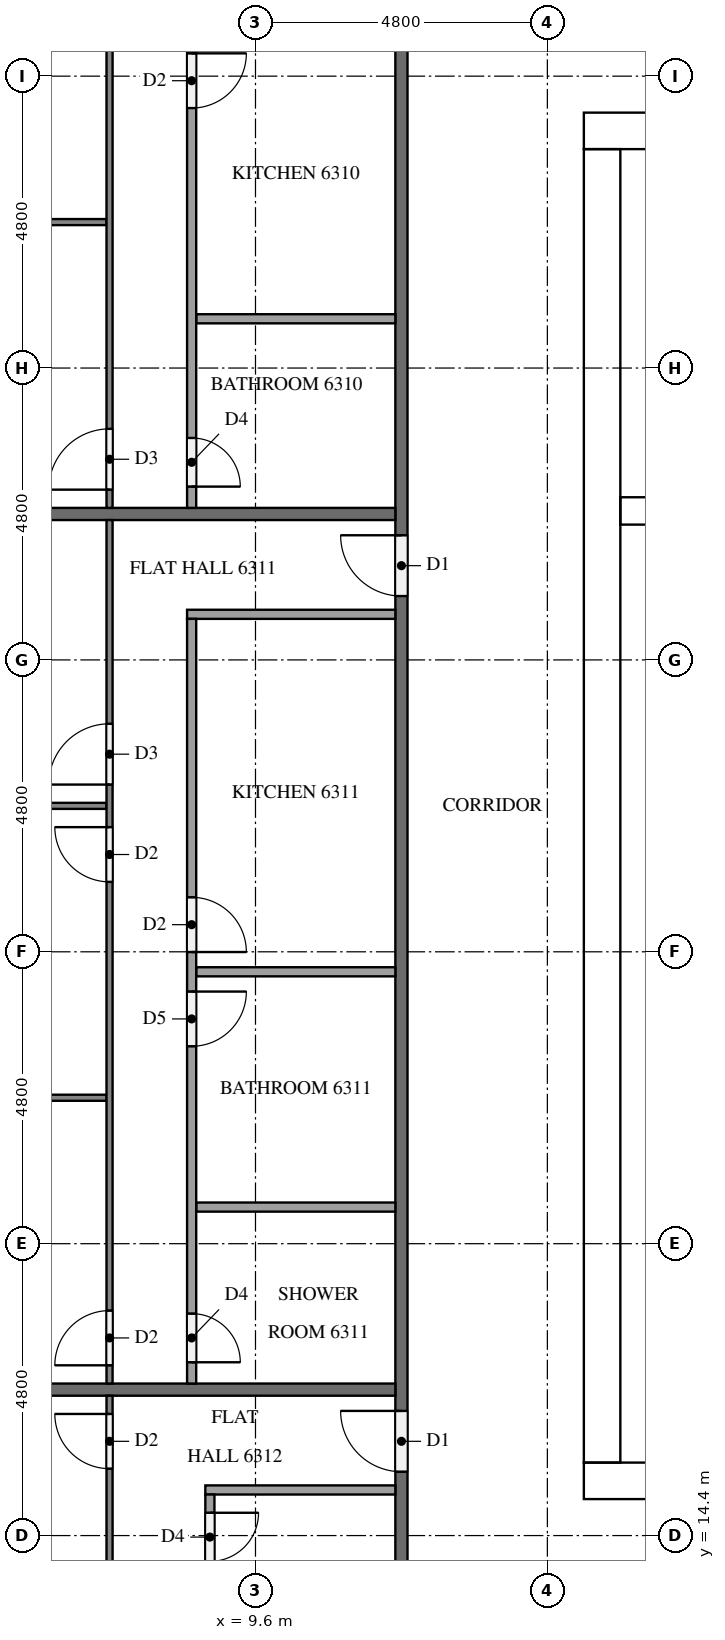
"""IFC4 building model, lengths in metres.
Left out: names, types, materials, properties, quantities, classifications, styles, units other than length and angle.
Written with IfcOpenShell. Run it as: python <this file> out.ifc"""

import sys

from ifc_helpers import new_model, si_unit, direction, frame, frame_2d, origin, place, context, subcontext, project, spatial, rectangle, extrude, element, fill, save


model = new_model("IFC4")
c1 = context("Model", 3, precision=1e-05, world=origin(), true_north=direction((0.0, 1.0)))
c2 = subcontext(c1, "Body", "Model", "MODEL_VIEW")
j1 = project(units=[si_unit("LENGTHUNIT", "METRE"), si_unit("PLANEANGLEUNIT", "RADIAN")], contexts=[c1])
p1 = place(None, origin())
s1 = spatial("IfcSite", under=j1, at=p1, CompositionType="ELEMENT")
p2 = place(p1, origin())
s2 = spatial("IfcBuilding", under=s1, at=p2, CompositionType="ELEMENT")
p3 = place(p2, frame((0.0, 0.0, 242.2)))
s3 = spatial("IfcBuildingStorey", under=s2, at=p3, CompositionType="ELEMENT", Elevation=242.2)
p4 = place(p3, frame((15.0, 15.3, 0.0), z_axis=(0.0, 0.0, 1.0), x_axis=(1.0, 0.0, 0.0)))
e1 = element("IfcWall", 1, at=p4, inside=s3, PredefinedType="SHEAR", context=c2, shape_type="SweptSolid", body=[
    extrude(rectangle(XDim=32.4, YDim=0.6, at=frame_2d((16.2, 0.0))), origin(), (0.0, 0.0, 1.0), 3.2),
])
p5 = place(p4, frame((15.3, 0.0, 0.0)))
e2 = element("IfcOpeningElement", 2, at=p5, cuts=e1, PredefinedType="OPENING", context=c2, shape_type="SweptSolid", body=[
    extrude(rectangle(XDim=1.8, YDim=2.1, at=frame_2d((0.9, 1.05))), frame((0.0, 0.31, 0.0), z_axis=(0.0, -1.0, 0.0), x_axis=(1.0, 0.0, 0.0)), (0.0, 0.0, 1.0), 0.62),
])
p6 = place(p3, frame((15.0, 37.5, 0.0), z_axis=(0.0, 0.0, 1.0), x_axis=(1.0, 0.0, 0.0)))
e3 = element("IfcWall", 3, at=p6, inside=s3, PredefinedType="SHEAR", context=c2, shape_type="SweptSolid", body=[
    extrude(rectangle(XDim=32.4, YDim=0.6, at=frame_2d((16.2, 0.0))), origin(), (0.0, 0.0, 1.0), 3.2),
])
p7 = place(p6, frame((15.3, 0.0, 0.0)))
e4 = element("IfcOpeningElement", 4, at=p7, cuts=e3, PredefinedType="OPENING", context=c2, shape_type="SweptSolid", body=[
    extrude(rectangle(XDim=1.8, YDim=2.1, at=frame_2d((0.9, 1.05))), frame((0.0, 0.31, 0.0), z_axis=(0.0, -1.0, 0.0), x_axis=(1.0, 0.0, 0.0)), (0.0, 0.0, 1.0), 0.62),
])
p8 = place(p6, frame((1.25, 0.0, 0.0)))
e5 = element("IfcOpeningElement", 5, at=p8, cuts=e3, PredefinedType="OPENING", context=c2, shape_type="SweptSolid", body=[
    extrude(rectangle(XDim=1.0, YDim=2.1, at=frame_2d((0.5, 1.05))), frame((0.0, 0.31, 0.0), z_axis=(0.0, -1.0, 0.0), x_axis=(1.0, 0.0, 0.0)), (0.0, 0.0, 1.0), 0.62),
])
p9 = place(p6, frame((4.988, 0.0, 0.0)))
e6 = element("IfcOpeningElement", 6, at=p9, cuts=e3, PredefinedType="OPENING", context=c2, shape_type="SweptSolid", body=[
    extrude(rectangle(XDim=1.0, YDim=2.1, at=frame_2d((0.5, 1.05))), frame((0.0, 0.31, 0.0), z_axis=(0.0, -1.0, 0.0), x_axis=(1.0, 0.0, 0.0)), (0.0, 0.0, 1.0), 0.62),
])
p10 = place(p3, frame((15.3, 15.6, 0.0), z_axis=(0.0, 0.0, 1.0), x_axis=(0.0, 1.0, 0.0)))
e7 = element("IfcWall", 7, at=p10, inside=s3, PredefinedType="SHEAR", context=c2, shape_type="SweptSolid", body=[
    extrude(rectangle(XDim=21.6, YDim=0.6, at=frame_2d((10.8, 0.0))), origin(), (0.0, 0.0, 1.0), 3.2),
])
p11 = place(p10, frame((5.16, 0.0, 0.0)))
e8 = element("IfcOpeningElement", 8, at=p11, cuts=e7, PredefinedType="OPENING", context=c2, shape_type="SweptSolid", body=[
    extrude(rectangle(XDim=1.2, YDim=2.1, at=frame_2d((0.6, 1.05))), frame((0.0, 0.31, 0.0), z_axis=(0.0, -1.0, 0.0), x_axis=(1.0, 0.0, 0.0)), (0.0, 0.0, 1.0), 0.62),
])
p12 = place(p3, frame((15.6, 31.25, 0.0), z_axis=(0.0, 0.0, 1.0), x_axis=(1.0, 0.0, 0.0)))
e9 = element("IfcWall", 9, at=p12, inside=s3, PredefinedType="SHEAR", context=c2, shape_type="SweptSolid", body=[
    extrude(rectangle(XDim=7.275, YDim=0.45, at=frame_2d((3.637, 0.0))), origin(), (0.0, 0.0, 1.0), 3.2),
])
p13 = place(p3, frame((12.0, 12.1, 0.0), z_axis=(0.0, 0.0, 1.0), x_axis=(0.0, 1.0, 0.0)))
e10 = element("IfcWall", 10, at=p13, inside=s3, PredefinedType="PARTITIONING", context=c2, shape_type="SweptSolid", body=[
    extrude(rectangle(XDim=28.6, YDim=0.2, at=frame_2d((14.3, 0.0))), origin(), (0.0, 0.0, 1.0), 3.2),
])
p14 = place(p13, frame((27.35, 0.0, 0.0)))
e11 = element("IfcOpeningElement", 11, at=p14, cuts=e10, PredefinedType="OPENING", context=c2, shape_type="SweptSolid", body=[
    extrude(rectangle(XDim=1.0, YDim=2.1, at=frame_2d((0.5, 1.05))), frame((0.0, 0.11, 0.0), z_axis=(0.0, -1.0, 0.0), x_axis=(1.0, 0.0, 0.0)), (0.0, 0.0, 1.0), 0.22),
])
p15 = place(p13, frame((17.75, 0.0, 0.0)))
e12 = element("IfcOpeningElement", 12, at=p15, cuts=e10, PredefinedType="OPENING", context=c2, shape_type="SweptSolid", body=[
    extrude(rectangle(XDim=1.0, YDim=2.1, at=frame_2d((0.5, 1.05))), frame((0.0, 0.11, 0.0), z_axis=(0.0, -1.0, 0.0), x_axis=(1.0, 0.0, 0.0)), (0.0, 0.0, 1.0), 0.22),
])
p16 = place(p13, frame((3.35, 0.0, 0.0)))
e13 = element("IfcOpeningElement", 13, at=p16, cuts=e10, PredefinedType="OPENING", context=c2, shape_type="SweptSolid", body=[
    extrude(rectangle(XDim=1.0, YDim=2.1, at=frame_2d((0.5, 1.05))), frame((0.0, 0.11, 0.0), z_axis=(0.0, -1.0, 0.0), x_axis=(1.0, 0.0, 0.0)), (0.0, 0.0, 1.0), 0.22),
])
for number, where, z_axis, x_axis in (
    (14, (0.1, 31.2, 0.0), (0.0, 0.0, 1.0), (1.0, 0.0, 0.0)),
    (15, (0.1, 16.8, 0.0), (0.0, 0.0, 1.0), (1.0, 0.0, 0.0)),
):
    element("IfcWall", number, at=place(p3, frame(where, z_axis=z_axis, x_axis=x_axis)), inside=s3, PredefinedType="PARTITIONING", context=c2, shape_type="SweptSolid", body=[
        extrude(rectangle(XDim=11.8, YDim=0.2, at=frame_2d((5.9, 0.0))), origin(), (0.0, 0.0, 1.0), 3.2),
    ])
p17 = place(p3, frame((7.15, 36.0, 0.0), z_axis=(0.0, 0.0, 1.0), x_axis=(-1.0, 0.0, 0.0)))
e16 = element("IfcWall", 16, at=p17, inside=s3, PredefinedType="PARTITIONING", context=c2, shape_type="SweptSolid", body=[
    extrude(rectangle(XDim=7.05, YDim=0.1, at=frame_2d((3.525, 0.0))), origin(), (0.0, 0.0, 1.0), 3.2),
])
p18 = place(p3, frame((7.2, 31.3, 0.0), z_axis=(0.0, 0.0, 1.0), x_axis=(0.0, 1.0, 0.0)))
e17 = element("IfcWall", 17, at=p18, inside=s3, PredefinedType="PARTITIONING", context=c2, shape_type="SweptSolid", body=[
    extrude(rectangle(XDim=9.4, YDim=0.1, at=frame_2d((4.7, 0.0))), origin(), (0.0, 0.0, 1.0), 3.2),
])
p19 = place(p18, frame((8.2, 0.0, 0.0)))
e18 = element("IfcOpeningElement", 18, at=p19, cuts=e17, PredefinedType="OPENING", context=c2, shape_type="SweptSolid", body=[
    extrude(rectangle(XDim=0.9, YDim=2.1, at=frame_2d((0.45, 1.05))), frame((0.0, 0.06, 0.0), z_axis=(0.0, -1.0, 0.0), x_axis=(1.0, 0.0, 0.0)), (0.0, 0.0, 1.0), 0.12),
])
p20 = place(p18, frame((0.3, 0.0, 0.0)))
e19 = element("IfcOpeningElement", 19, at=p20, cuts=e17, PredefinedType="OPENING", context=c2, shape_type="SweptSolid", body=[
    extrude(rectangle(XDim=1.0, YDim=2.1, at=frame_2d((0.5, 1.05))), frame((0.0, 0.06, 0.0), z_axis=(0.0, -1.0, 0.0), x_axis=(1.0, 0.0, 0.0)), (0.0, 0.0, 1.0), 0.12),
])
p21 = place(p3, frame((11.9, 34.41, 0.0), z_axis=(0.0, 0.0, 1.0), x_axis=(-1.0, 0.0, 0.0)))
e20 = element("IfcWall", 20, at=p21, inside=s3, PredefinedType="PARTITIONING", context=c2, shape_type="SweptSolid", body=[
    extrude(rectangle(XDim=3.275, YDim=0.15, at=frame_2d((1.637, 0.0))), origin(), (0.0, 0.0, 1.0), 3.2),
])
p22 = place(p3, frame((8.55, 39.075, 0.0), z_axis=(0.0, 0.0, 1.0), x_axis=(0.0, -1.0, 0.0)))
e21 = element("IfcWall", 21, at=p22, inside=s3, PredefinedType="PARTITIONING", context=c2, shape_type="SweptSolid", body=[
    extrude(rectangle(XDim=7.775, YDim=0.15, at=frame_2d((3.887, 0.0))), origin(), (0.0, 0.0, 1.0), 3.2),
])
p23 = place(p22, frame((0.3, 0.0, 0.0)))
e22 = element("IfcOpeningElement", 22, at=p23, cuts=e21, PredefinedType="OPENING", context=c2, shape_type="SweptSolid", body=[
    extrude(rectangle(XDim=0.9, YDim=2.1, at=frame_2d((0.45, 1.05))), frame((0.0, 0.085, 0.0), z_axis=(0.0, -1.0, 0.0), x_axis=(1.0, 0.0, 0.0)), (0.0, 0.0, 1.0), 0.17),
])
p24 = place(p22, frame((6.625, 0.0, 0.0)))
e23 = element("IfcOpeningElement", 23, at=p24, cuts=e21, PredefinedType="OPENING", context=c2, shape_type="SweptSolid", body=[
    extrude(rectangle(XDim=0.8, YDim=2.1, at=frame_2d((0.4, 1.05))), frame((0.0, 0.085, 0.0), z_axis=(0.0, -1.0, 0.0), x_axis=(1.0, 0.0, 0.0)), (0.0, 0.0, 1.0), 0.17),
])
for number, where, z_axis, x_axis in (
    (24, (7.15, 26.4, 0.0), (0.0, 0.0, 1.0), (-1.0, 0.0, 0.0)),
    (25, (7.15, 21.6, 0.0), (0.0, 0.0, 1.0), (-1.0, 0.0, 0.0)),
):
    element("IfcWall", number, at=place(p3, frame(where, z_axis=z_axis, x_axis=x_axis)), inside=s3, PredefinedType="PARTITIONING", context=c2, shape_type="SweptSolid", body=[
        extrude(rectangle(XDim=7.05, YDim=0.1, at=frame_2d((3.525, 0.0))), origin(), (0.0, 0.0, 1.0), 3.2),
    ])
p25 = place(p3, frame((7.2, 16.9, 0.0), z_axis=(0.0, 0.0, 1.0), x_axis=(0.0, 1.0, 0.0)))
e26 = element("IfcWall", 26, at=p25, inside=s3, PredefinedType="PARTITIONING", context=c2, shape_type="SweptSolid", body=[
    extrude(rectangle(XDim=14.2, YDim=0.1, at=frame_2d((7.1, 0.0))), origin(), (0.0, 0.0, 1.0), 3.2),
])
p26 = place(p25, frame((9.85, 0.0, 0.0)))
e27 = element("IfcOpeningElement", 27, at=p26, cuts=e26, PredefinedType="OPENING", context=c2, shape_type="SweptSolid", body=[
    extrude(rectangle(XDim=1.0, YDim=2.1, at=frame_2d((0.5, 1.05))), frame((0.0, 0.06, 0.0), z_axis=(0.0, -1.0, 0.0), x_axis=(1.0, 0.0, 0.0)), (0.0, 0.0, 1.0), 0.12),
])
p27 = place(p25, frame((8.25, 0.0, 0.0)))
e28 = element("IfcOpeningElement", 28, at=p27, cuts=e26, PredefinedType="OPENING", context=c2, shape_type="SweptSolid", body=[
    extrude(rectangle(XDim=0.9, YDim=2.1, at=frame_2d((0.45, 1.05))), frame((0.0, 0.06, 0.0), z_axis=(0.0, -1.0, 0.0), x_axis=(1.0, 0.0, 0.0)), (0.0, 0.0, 1.0), 0.12),
])
p28 = place(p25, frame((0.3, 0.0, 0.0)))
e29 = element("IfcOpeningElement", 29, at=p28, cuts=e26, PredefinedType="OPENING", context=c2, shape_type="SweptSolid", body=[
    extrude(rectangle(XDim=0.9, YDim=2.1, at=frame_2d((0.45, 1.05))), frame((0.0, 0.06, 0.0), z_axis=(0.0, -1.0, 0.0), x_axis=(1.0, 0.0, 0.0)), (0.0, 0.0, 1.0), 0.12),
])
for number, where, z_axis, x_axis in (
    (30, (11.9, 23.671, 0.0), (0.0, 0.0, 1.0), (-1.0, 0.0, 0.0)),
    (31, (11.9, 19.802, 0.0), (0.0, 0.0, 1.0), (-1.0, 0.0, 0.0)),
):
    element("IfcWall", number, at=place(p3, frame(where, z_axis=z_axis, x_axis=x_axis)), inside=s3, PredefinedType="PARTITIONING", context=c2, shape_type="SweptSolid", body=[
        extrude(rectangle(XDim=3.275, YDim=0.15, at=frame_2d((1.637, 0.0))), origin(), (0.0, 0.0, 1.0), 3.2),
    ])
p29 = place(p3, frame((11.9, 29.55, 0.0), z_axis=(0.0, 0.0, 1.0), x_axis=(-1.0, 0.0, 0.0)))
e32 = element("IfcWall", 32, at=p29, inside=s3, PredefinedType="PARTITIONING", context=c2, shape_type="SweptSolid", body=[
    extrude(rectangle(XDim=3.425, YDim=0.15, at=frame_2d((1.712, 0.0))), origin(), (0.0, 0.0, 1.0), 3.2),
])
p30 = place(p3, frame((8.55, 29.475, 0.0), z_axis=(0.0, 0.0, 1.0), x_axis=(0.0, -1.0, 0.0)))
e33 = element("IfcWall", 33, at=p30, inside=s3, PredefinedType="PARTITIONING", context=c2, shape_type="SweptSolid", body=[
    extrude(rectangle(XDim=12.575, YDim=0.15, at=frame_2d((6.288, 0.0))), origin(), (0.0, 0.0, 1.0), 3.2),
])
p31 = place(p30, frame((4.579, 0.0, 0.0)))
e34 = element("IfcOpeningElement", 34, at=p31, cuts=e33, PredefinedType="OPENING", context=c2, shape_type="SweptSolid", body=[
    extrude(rectangle(XDim=0.9, YDim=2.1, at=frame_2d((0.45, 1.05))), frame((0.0, 0.085, 0.0), z_axis=(0.0, -1.0, 0.0), x_axis=(1.0, 0.0, 0.0)), (0.0, 0.0, 1.0), 0.17),
])
p32 = place(p30, frame((6.129, 0.0, 0.0)))
e35 = element("IfcOpeningElement", 35, at=p32, cuts=e33, PredefinedType="OPENING", context=c2, shape_type="SweptSolid", body=[
    extrude(rectangle(XDim=0.9, YDim=2.1, at=frame_2d((0.45, 1.05))), frame((0.0, 0.085, 0.0), z_axis=(0.0, -1.0, 0.0), x_axis=(1.0, 0.0, 0.0)), (0.0, 0.0, 1.0), 0.17),
])
p33 = place(p30, frame((11.425, 0.0, 0.0)))
e36 = element("IfcOpeningElement", 36, at=p33, cuts=e33, PredefinedType="OPENING", context=c2, shape_type="SweptSolid", body=[
    extrude(rectangle(XDim=0.8, YDim=2.1, at=frame_2d((0.4, 1.05))), frame((0.0, 0.085, 0.0), z_axis=(0.0, -1.0, 0.0), x_axis=(1.0, 0.0, 0.0)), (0.0, 0.0, 1.0), 0.17),
])
p34 = place(p3, frame((7.2, 4.9, 0.0), z_axis=(0.0, 0.0, 1.0), x_axis=(0.0, 1.0, 0.0)))
e37 = element("IfcWall", 37, at=p34, inside=s3, PredefinedType="PARTITIONING", context=c2, shape_type="SweptSolid", body=[
    extrude(rectangle(XDim=11.8, YDim=0.1, at=frame_2d((5.9, 0.0))), origin(), (0.0, 0.0, 1.0), 3.2),
])
p35 = place(p34, frame((10.6, 0.0, 0.0)))
e38 = element("IfcOpeningElement", 38, at=p35, cuts=e37, PredefinedType="OPENING", context=c2, shape_type="SweptSolid", body=[
    extrude(rectangle(XDim=0.9, YDim=2.1, at=frame_2d((0.45, 1.05))), frame((0.0, 0.06, 0.0), z_axis=(0.0, -1.0, 0.0), x_axis=(1.0, 0.0, 0.0)), (0.0, 0.0, 1.0), 0.12),
])
p36 = place(p34, frame((0.3, 0.0, 0.0)))
e39 = element("IfcOpeningElement", 39, at=p36, cuts=e37, PredefinedType="OPENING", context=c2, shape_type="SweptSolid", body=[
    extrude(rectangle(XDim=1.0, YDim=2.1, at=frame_2d((0.5, 1.05))), frame((0.0, 0.06, 0.0), z_axis=(0.0, -1.0, 0.0), x_axis=(1.0, 0.0, 0.0)), (0.0, 0.0, 1.0), 0.12),
])
p37 = place(p3, frame((11.9, 15.15, 0.0), z_axis=(0.0, 0.0, 1.0), x_axis=(-1.0, 0.0, 0.0)))
e40 = element("IfcWall", 40, at=p37, inside=s3, PredefinedType="PARTITIONING", context=c2, shape_type="SweptSolid", body=[
    extrude(rectangle(XDim=3.125, YDim=0.15, at=frame_2d((1.562, 0.0))), origin(), (0.0, 0.0, 1.0), 3.2),
])
p38 = place(p3, frame((8.85, 15.075, 0.0), z_axis=(0.0, 0.0, 1.0), x_axis=(0.0, -1.0, 0.0)))
e41 = element("IfcWall", 41, at=p38, inside=s3, PredefinedType="PARTITIONING", context=c2, shape_type="SweptSolid", body=[
    extrude(rectangle(XDim=10.175, YDim=0.15, at=frame_2d((5.087, 0.0))), origin(), (0.0, 0.0, 1.0), 3.2),
])
p39 = place(p38, frame((0.3, 0.0, 0.0)))
e42 = element("IfcOpeningElement", 42, at=p39, cuts=e41, PredefinedType="OPENING", context=c2, shape_type="SweptSolid", body=[
    extrude(rectangle(XDim=0.8, YDim=2.1, at=frame_2d((0.4, 1.05))), frame((0.0, 0.085, 0.0), z_axis=(0.0, -1.0, 0.0), x_axis=(1.0, 0.0, 0.0)), (0.0, 0.0, 1.0), 0.17),
])
p40 = place(p38, frame((8.925, 0.0, 0.0)))
e43 = element("IfcOpeningElement", 43, at=p40, cuts=e41, PredefinedType="OPENING", context=c2, shape_type="SweptSolid", body=[
    extrude(rectangle(XDim=0.9, YDim=2.1, at=frame_2d((0.45, 1.05))), frame((0.0, 0.085, 0.0), z_axis=(0.0, -1.0, 0.0), x_axis=(1.0, 0.0, 0.0)), (0.0, 0.0, 1.0), 0.17),
])
p41 = place(p11, frame((1.2, 0.0, 0.0), z_axis=(0.0, 0.0, 1.0), x_axis=(-1.0, 0.0, 0.0)))
e44 = element("IfcDoor", 44, at=p41, inside=s3, OperationType="SINGLE_SWING_RIGHT", PredefinedType="DOOR", context=c2, shape_type="SweptSolid", body=[
    extrude(rectangle(XDim=1.2, YDim=2.1, at=frame_2d((0.6, 1.05))), frame((0.0, 0.025, 0.0), z_axis=(0.0, -1.0, 0.0), x_axis=(1.0, 0.0, 0.0)), (0.0, 0.0, 1.0), 0.05),
])
fill(e8, e44)
p42 = place(p15, origin())
e45 = element("IfcDoor", 45, at=p42, inside=s3, OperationType="SINGLE_SWING_RIGHT", PredefinedType="DOOR", context=c2, shape_type="SweptSolid", body=[
    extrude(rectangle(XDim=1.0, YDim=2.1, at=frame_2d((0.5, 1.05))), frame((0.0, 0.025, 0.0), z_axis=(0.0, -1.0, 0.0), x_axis=(1.0, 0.0, 0.0)), (0.0, 0.0, 1.0), 0.05),
])
fill(e12, e45)
p43 = place(p16, origin())
e46 = element("IfcDoor", 46, at=p43, inside=s3, OperationType="SINGLE_SWING_RIGHT", PredefinedType="DOOR", context=c2, shape_type="SweptSolid", body=[
    extrude(rectangle(XDim=1.0, YDim=2.1, at=frame_2d((0.5, 1.05))), frame((0.0, 0.025, 0.0), z_axis=(0.0, -1.0, 0.0), x_axis=(1.0, 0.0, 0.0)), (0.0, 0.0, 1.0), 0.05),
])
fill(e13, e46)
p44 = place(p20, origin())
e47 = element("IfcDoor", 47, at=p44, inside=s3, OperationType="SINGLE_SWING_LEFT", PredefinedType="DOOR", context=c2, shape_type="SweptSolid", body=[
    extrude(rectangle(XDim=1.0, YDim=2.1, at=frame_2d((0.5, 1.05))), frame((0.0, 0.025, 0.0), z_axis=(0.0, -1.0, 0.0), x_axis=(1.0, 0.0, 0.0)), (0.0, 0.0, 1.0), 0.05),
])
fill(e19, e47)
p45 = place(p23, origin())
e48 = element("IfcDoor", 48, at=p45, inside=s3, OperationType="SINGLE_SWING_LEFT", PredefinedType="DOOR", context=c2, shape_type="SweptSolid", body=[
    extrude(rectangle(XDim=0.9, YDim=2.1, at=frame_2d((0.45, 1.05))), frame((0.0, 0.025, 0.0), z_axis=(0.0, -1.0, 0.0), x_axis=(1.0, 0.0, 0.0)), (0.0, 0.0, 1.0), 0.05),
])
fill(e22, e48)
p46 = place(p24, origin())
e49 = element("IfcDoor", 49, at=p46, inside=s3, OperationType="SINGLE_SWING_RIGHT", PredefinedType="DOOR", context=c2, shape_type="SweptSolid", body=[
    extrude(rectangle(XDim=0.8, YDim=2.1, at=frame_2d((0.4, 1.05))), frame((0.0, 0.025, 0.0), z_axis=(0.0, -1.0, 0.0), x_axis=(1.0, 0.0, 0.0)), (0.0, 0.0, 1.0), 0.05),
])
fill(e23, e49)
p47 = place(p26, origin())
e50 = element("IfcDoor", 50, at=p47, inside=s3, OperationType="SINGLE_SWING_LEFT", PredefinedType="DOOR", context=c2, shape_type="SweptSolid", body=[
    extrude(rectangle(XDim=1.0, YDim=2.1, at=frame_2d((0.5, 1.05))), frame((0.0, 0.025, 0.0), z_axis=(0.0, -1.0, 0.0), x_axis=(1.0, 0.0, 0.0)), (0.0, 0.0, 1.0), 0.05),
])
fill(e27, e50)
p48 = place(p27, origin())
e51 = element("IfcDoor", 51, at=p48, inside=s3, OperationType="SINGLE_SWING_RIGHT", PredefinedType="DOOR", context=c2, shape_type="SweptSolid", body=[
    extrude(rectangle(XDim=0.9, YDim=2.1, at=frame_2d((0.45, 1.05))), frame((0.0, 0.025, 0.0), z_axis=(0.0, -1.0, 0.0), x_axis=(1.0, 0.0, 0.0)), (0.0, 0.0, 1.0), 0.05),
])
fill(e28, e51)
p49 = place(p28, origin())
e52 = element("IfcDoor", 52, at=p49, inside=s3, OperationType="SINGLE_SWING_LEFT", PredefinedType="DOOR", context=c2, shape_type="SweptSolid", body=[
    extrude(rectangle(XDim=0.9, YDim=2.1, at=frame_2d((0.45, 1.05))), frame((0.0, 0.025, 0.0), z_axis=(0.0, -1.0, 0.0), x_axis=(1.0, 0.0, 0.0)), (0.0, 0.0, 1.0), 0.05),
])
fill(e29, e52)
p50 = place(p31, origin())
e53 = element("IfcDoor", 53, at=p50, inside=s3, OperationType="SINGLE_SWING_RIGHT", PredefinedType="DOOR", context=c2, shape_type="SweptSolid", body=[
    extrude(rectangle(XDim=0.9, YDim=2.1, at=frame_2d((0.45, 1.05))), frame((0.0, 0.025, 0.0), z_axis=(0.0, -1.0, 0.0), x_axis=(1.0, 0.0, 0.0)), (0.0, 0.0, 1.0), 0.05),
])
fill(e34, e53)
p51 = place(p32, origin())
e54 = element("IfcDoor", 54, at=p51, inside=s3, OperationType="SINGLE_SWING_LEFT", PredefinedType="DOOR", context=c2, shape_type="SweptSolid", body=[
    extrude(rectangle(XDim=0.9, YDim=2.1, at=frame_2d((0.45, 1.05))), frame((0.0, 0.025, 0.0), z_axis=(0.0, -1.0, 0.0), x_axis=(1.0, 0.0, 0.0)), (0.0, 0.0, 1.0), 0.05),
])
fill(e35, e54)
p52 = place(p33, origin())
e55 = element("IfcDoor", 55, at=p52, inside=s3, OperationType="SINGLE_SWING_RIGHT", PredefinedType="DOOR", context=c2, shape_type="SweptSolid", body=[
    extrude(rectangle(XDim=0.8, YDim=2.1, at=frame_2d((0.4, 1.05))), frame((0.0, 0.025, 0.0), z_axis=(0.0, -1.0, 0.0), x_axis=(1.0, 0.0, 0.0)), (0.0, 0.0, 1.0), 0.05),
])
fill(e36, e55)
p53 = place(p35, origin())
e56 = element("IfcDoor", 56, at=p53, inside=s3, OperationType="SINGLE_SWING_RIGHT", PredefinedType="DOOR", context=c2, shape_type="SweptSolid", body=[
    extrude(rectangle(XDim=0.9, YDim=2.1, at=frame_2d((0.45, 1.05))), frame((0.0, 0.025, 0.0), z_axis=(0.0, -1.0, 0.0), x_axis=(1.0, 0.0, 0.0)), (0.0, 0.0, 1.0), 0.05),
])
fill(e38, e56)
p54 = place(p39, origin())
e57 = element("IfcDoor", 57, at=p54, inside=s3, OperationType="SINGLE_SWING_LEFT", PredefinedType="DOOR", context=c2, shape_type="SweptSolid", body=[
    extrude(rectangle(XDim=0.8, YDim=2.1, at=frame_2d((0.4, 1.05))), frame((0.0, 0.025, 0.0), z_axis=(0.0, -1.0, 0.0), x_axis=(1.0, 0.0, 0.0)), (0.0, 0.0, 1.0), 0.05),
])
fill(e42, e57)
save(model, sys.argv[1])
